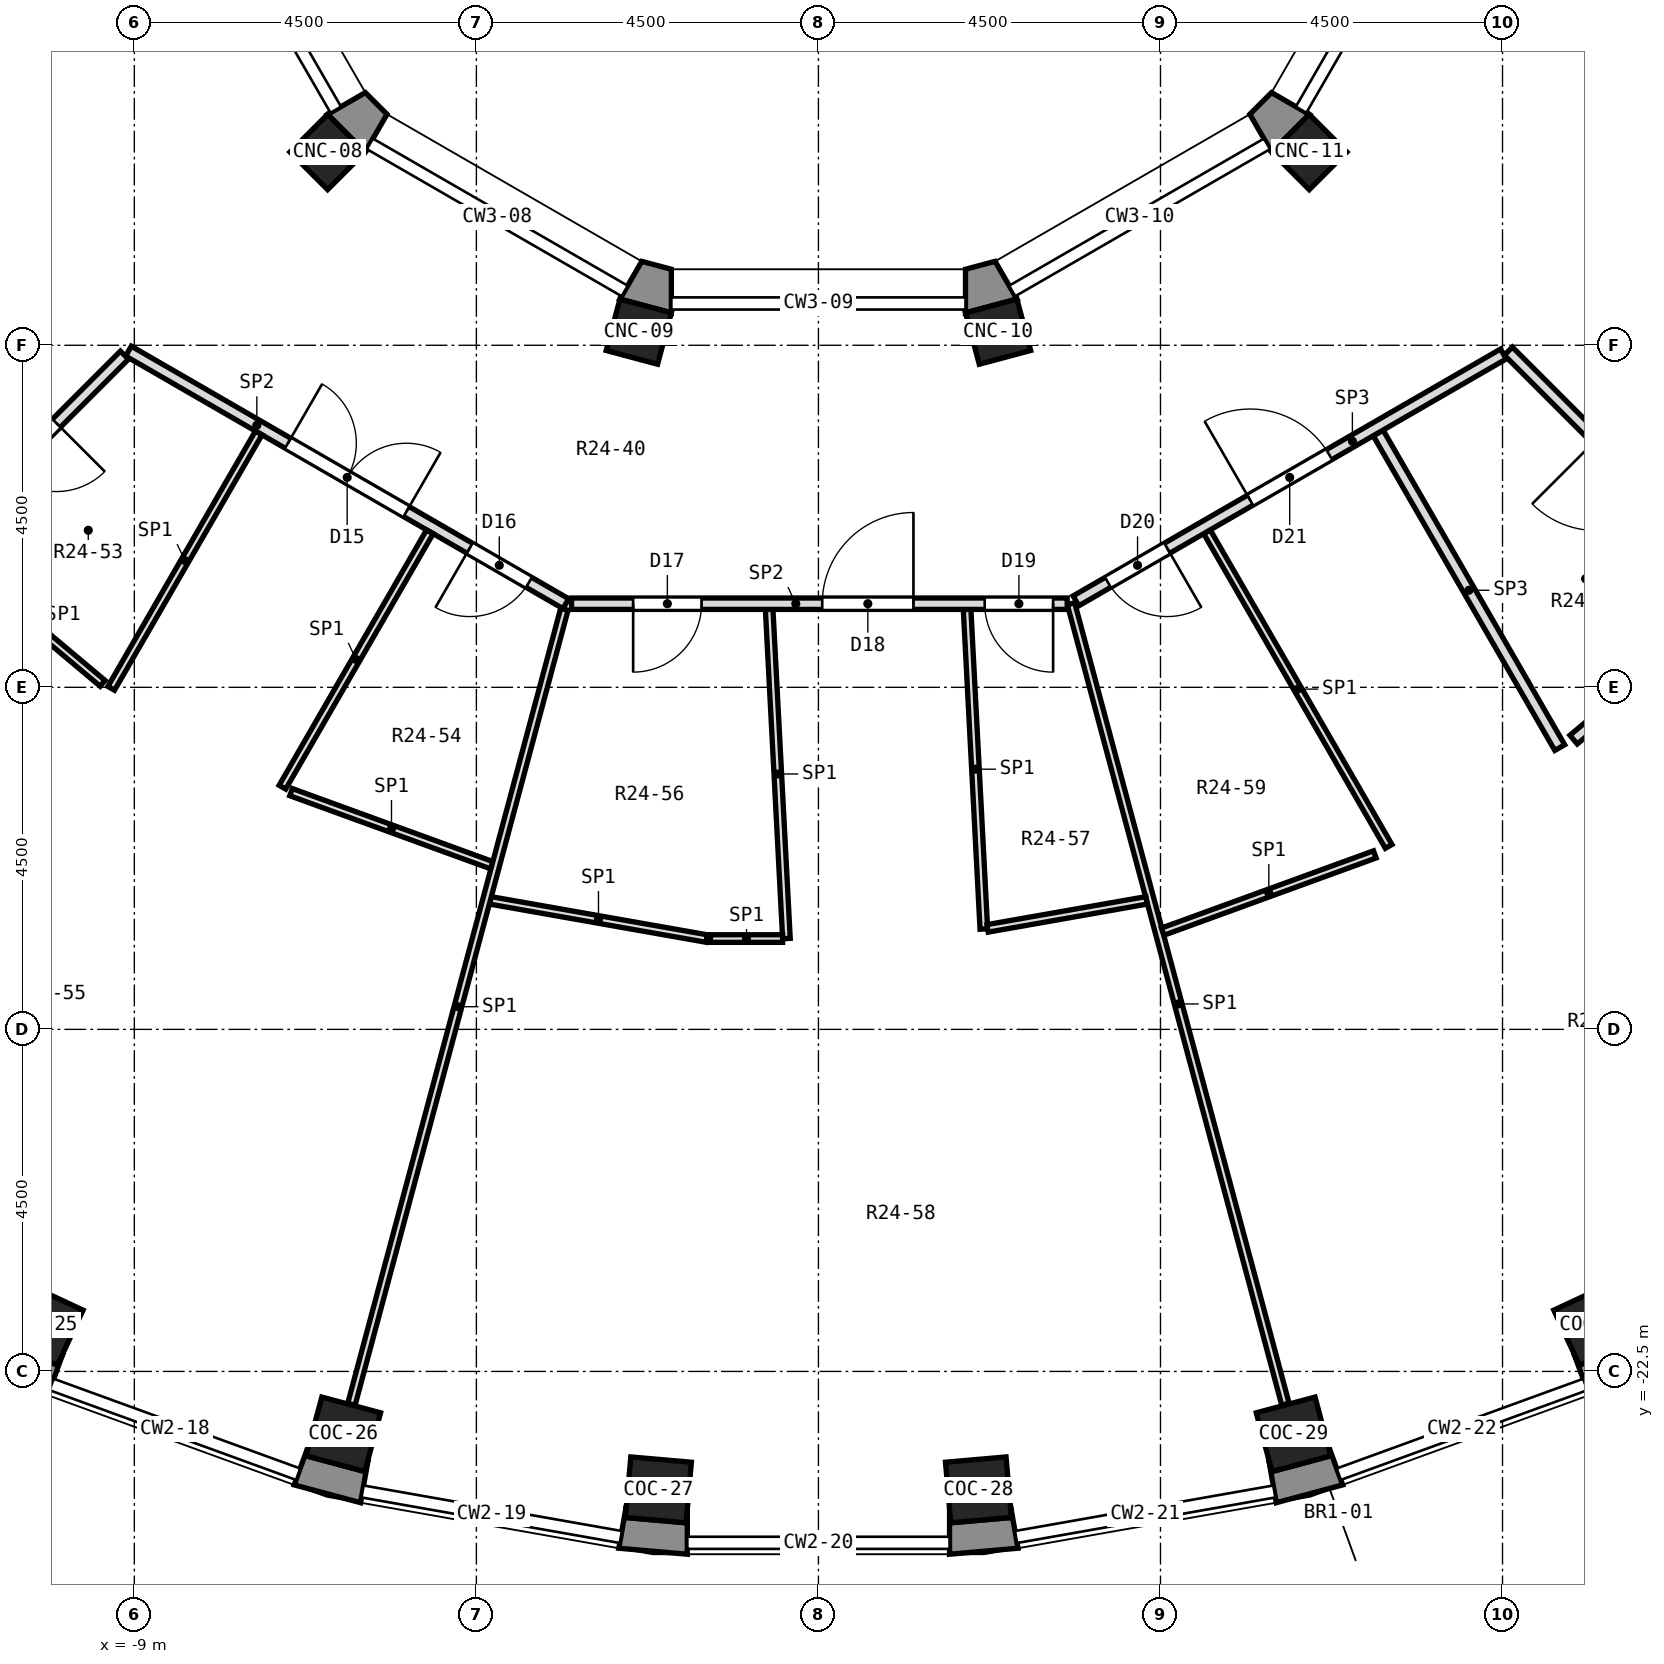
"""IFC4 building model, lengths in metres.
Left out: names, types, materials, properties, quantities, classifications, styles, units other than length and angle.
Written with IfcOpenShell. Run it as: python <this file> out.ifc"""

import sys

from ifc_helpers import new_model, si_unit, direction, frame, frame_2d, origin, origin_2d, place, context, subcontext, project, spatial, polyline, rectangle, outline, extrude, element, fill, save


model = new_model("IFC4")
c1 = context("Model", 3, precision=1e-05, world=origin(), true_north=direction((0.0, 1.0)))
c2 = subcontext(c1, "Body", "Model", "MODEL_VIEW")
j1 = project(units=[si_unit("LENGTHUNIT", "METRE"), si_unit("PLANEANGLEUNIT", "RADIAN")], contexts=[c1])
p1 = place(None, origin())
s1 = spatial("IfcSite", under=j1, at=p1, CompositionType="ELEMENT")
p2 = place(p1, origin())
s2 = spatial("IfcBuilding", under=s1, at=p2, CompositionType="ELEMENT")
p3 = place(p2, frame((0.0, 0.0, 155.8)))
s3 = spatial("IfcBuildingStorey", under=s2, at=p3, CompositionType="ELEMENT", Elevation=155.8)
for number, where, z_axis, x_axis in (
    (1, (-10.206, -21.887, -0.55), (0.0, 0.0, 1.0), (-0.423, -0.906, 0.0)),
    (2, (-6.25, -23.327, -0.55), (0.0, 0.0, 1.0), (-0.259, -0.966, 0.0)),
    (3, (-2.105, -24.058, -0.55), (0.0, 0.0, 1.0), (-0.087, -0.996, 0.0)),
    (4, (2.105, -24.058, -0.55), (0.0, 0.0, 1.0), (0.087, -0.996, 0.0)),
    (5, (6.25, -23.327, -0.55), (0.0, 0.0, 1.0), (0.259, -0.966, 0.0)),
    (6, (10.206, -21.887, -0.55), (0.0, 0.0, 1.0), (0.423, -0.906, 0.0)),
):
    element("IfcColumn", number, at=place(p3, frame(where, z_axis=z_axis, x_axis=x_axis)), inside=s3, PredefinedType="COLUMN", context=c2, shape_type="SweptSolid", body=[
        extrude(rectangle(XDim=0.8, YDim=0.8, at=origin_2d()), origin(), (0.0, 0.0, 1.0), 5.55),
    ])
for number, where, z_axis, x_axis in (
    (7, (-6.458, -6.458, 0.0), (0.0, 0.0, 1.0), (-0.707, -0.707, 0.0)),
    (8, (-2.364, -8.821, 0.0), (0.0, 0.0, 1.0), (-0.259, -0.966, 0.0)),
    (9, (2.364, -8.821, 0.0), (0.0, 0.0, 1.0), (0.259, -0.966, 0.0)),
    (10, (6.458, -6.458, 0.0), (0.0, 0.0, 1.0), (0.707, -0.707, 0.0)),
):
    element("IfcColumn", number, at=place(p3, frame(where, z_axis=z_axis, x_axis=x_axis)), inside=s3, PredefinedType="COLUMN", context=c2, shape_type="SweptSolid", body=[
        extrude(rectangle(XDim=0.7, YDim=0.7, at=origin_2d()), origin(), (0.0, 0.0, 1.0), 5.0),
    ])
p4 = place(p3, origin())
e11 = element("IfcWall", 11, at=p4, inside=s3, PredefinedType="SOLIDWALL", context=c2, shape_type="SweptSolid", body=[
    extrude(outline(polyline([(-10.139, -22.813), (-9.934, -22.249), (-10.013, -22.419), (-10.738, -22.081), (-10.659, -21.911), (-10.959, -22.431), (-10.139, -22.813)])), origin(), (0.0, 0.0, 1.0), 4.55),
])
p5 = place(p3, origin())
e12 = element("IfcWall", 12, at=p5, inside=s3, PredefinedType="SOLIDWALL", context=c2, shape_type="SweptSolid", body=[
    extrude(outline(polyline([(-6.023, -24.227), (-5.919, -23.636), (-5.968, -23.817), (-6.74, -23.61), (-6.692, -23.429), (-6.897, -23.993), (-6.023, -24.227)])), origin(), (0.0, 0.0, 1.0), 4.55),
])
p6 = place(p3, origin())
e13 = element("IfcWall", 13, at=p6, inside=s3, PredefinedType="SOLIDWALL", context=c2, shape_type="SweptSolid", body=[
    extrude(outline(polyline([(-2.626, -24.826), (-1.725, -24.905), (-1.725, -24.305), (-1.741, -24.491), (-2.538, -24.422), (-2.522, -24.235), (-2.626, -24.826)])), origin(), (0.0, 0.0, 1.0), 4.55),
])
p7 = place(p3, origin())
e14 = element("IfcWall", 14, at=p7, inside=s3, PredefinedType="SOLIDWALL", context=c2, shape_type="SweptSolid", body=[
    extrude(outline(polyline([(1.725, -24.905), (2.626, -24.826), (2.522, -24.235), (2.538, -24.422), (1.741, -24.491), (1.725, -24.305), (1.725, -24.905)])), origin(), (0.0, 0.0, 1.0), 4.55),
])
p8 = place(p3, origin())
e15 = element("IfcWall", 15, at=p8, inside=s3, PredefinedType="SOLIDWALL", context=c2, shape_type="SweptSolid", body=[
    extrude(outline(polyline([(6.023, -24.227), (6.897, -23.993), (6.692, -23.429), (6.74, -23.61), (5.968, -23.817), (5.919, -23.636), (6.023, -24.227)])), origin(), (0.0, 0.0, 1.0), 4.55),
])
p9 = place(p3, origin())
e16 = element("IfcWall", 16, at=p9, inside=s3, PredefinedType="SOLIDWALL", context=c2, shape_type="SweptSolid", body=[
    extrude(outline(polyline([(10.959, -22.431), (10.659, -21.911), (10.738, -22.081), (10.013, -22.419), (9.934, -22.249), (10.139, -22.813), (10.959, -22.431)])), origin(), (0.0, 0.0, 1.0), 4.55),
])
p10 = place(p3, origin())
e17 = element("IfcWall", 17, at=p10, inside=s3, PredefinedType="SOLIDWALL", context=c2, shape_type="SweptSolid", body=[
    extrude(outline(polyline([(-6.458, -5.962), (-5.962, -6.458), (-5.676, -5.961), (-5.961, -5.676), (-6.458, -5.962)])), origin(), (0.0, 0.0, 1.0), 4.55),
])
p11 = place(p3, origin())
e18 = element("IfcWall", 18, at=p11, inside=s3, PredefinedType="SOLIDWALL", context=c2, shape_type="SweptSolid", body=[
    extrude(outline(polyline([(-1.935, -8.573), (-1.935, -8.0), (-2.324, -7.896), (-2.611, -8.392), (-1.935, -8.573)])), origin(), (0.0, 0.0, 1.0), 4.55),
])
p12 = place(p3, origin())
e19 = element("IfcWall", 19, at=p12, inside=s3, PredefinedType="SOLIDWALL", context=c2, shape_type="SweptSolid", body=[
    extrude(outline(polyline([(2.611, -8.392), (2.324, -7.896), (1.935, -8.0), (1.935, -8.573), (2.611, -8.392)])), origin(), (0.0, 0.0, 1.0), 4.55),
])
p13 = place(p3, origin())
e20 = element("IfcWall", 20, at=p13, inside=s3, PredefinedType="SOLIDWALL", context=c2, shape_type="SweptSolid", body=[
    extrude(outline(polyline([(5.962, -6.458), (6.458, -5.962), (5.961, -5.676), (5.676, -5.961), (5.962, -6.458)])), origin(), (0.0, 0.0, 1.0), 4.55),
])
p14 = place(p3, frame((-0.648, -12.475, 0.0), z_axis=(0.0, 0.0, 1.0), x_axis=(0.052419936627, -0.998625129988, 0.0)))
e21 = element("IfcWall", 21, at=p14, inside=s3, PredefinedType="PARTITIONING", context=c2, shape_type="SweptSolid", body=[
    extrude(rectangle(XDim=4.336, YDim=0.1, at=frame_2d((2.168, 0.0))), origin(), (0.0, 0.0, 1.0), 4.55),
])
p15 = place(p3, frame((1.956, -12.475, 0.0), z_axis=(0.0, 0.0, 1.0), x_axis=(0.052297124669, -0.998631569074, 0.0)))
e22 = element("IfcWall", 22, at=p15, inside=s3, PredefinedType="PARTITIONING", context=c2, shape_type="SweptSolid", body=[
    extrude(rectangle(XDim=4.211, YDim=0.1, at=frame_2d((2.105, 0.0))), origin(), (0.0, 0.0, 1.0), 4.55),
])
p16 = place(p3, frame((3.323, -12.4, 0.0), z_axis=(0.0, 0.0, 1.0), x_axis=(0.258724519119, -0.965951149493, 0.0)))
e23 = element("IfcWall", 23, at=p16, inside=s3, PredefinedType="PARTITIONING", context=c2, shape_type="SweptSolid", body=[
    extrude(rectangle(XDim=10.903, YDim=0.1, at=frame_2d((5.451, 0.0))), origin(), (0.0, 0.0, 1.0), 4.55),
])
p17 = place(p3, frame((5.112, -11.454, 0.0), z_axis=(0.0, 0.0, 1.0), x_axis=(0.500099733259, -0.865967815103, 0.0)))
e24 = element("IfcWall", 24, at=p17, inside=s3, PredefinedType="PARTITIONING", context=c2, shape_type="SweptSolid", body=[
    extrude(rectangle(XDim=4.78, YDim=0.1, at=frame_2d((2.39, 0.0))), origin(), (0.0, 0.0, 1.0), 4.55),
])
p18 = place(p3, frame((7.364, -10.153, 0.0), z_axis=(0.0, 0.0, 1.0), x_axis=(0.49988015136, -0.866094587373, 0.0)))
e25 = element("IfcWall", 25, at=p18, inside=s3, PredefinedType="PARTITIONING", context=c2, shape_type="SweptSolid", body=[
    extrude(rectangle(XDim=4.78, YDim=0.15, at=frame_2d((2.39, 0.0))), origin(), (0.0, 0.0, 1.0), 4.55),
])
p19 = place(p3, frame((9.077, -9.077, 0.0), z_axis=(0.0, 0.0, 1.0), x_axis=(0.707106781187, -0.707106781187, 0.0)))
e26 = element("IfcWall", 26, at=p19, inside=s3, PredefinedType="PARTITIONING", context=c2, shape_type="SweptSolid", body=[
    extrude(rectangle(XDim=5.71, YDim=0.15, at=frame_2d((2.855, 0.0))), origin(), (0.0, 0.0, 1.0), 4.55),
])
p20 = place(p19, frame((1.642, 0.0, 0.0)))
e27 = element("IfcOpeningElement", 27, at=p20, cuts=e26, PredefinedType="OPENING", context=c2, shape_type="SweptSolid", body=[
    extrude(rectangle(XDim=1.2, YDim=2.1, at=frame_2d((0.6, 1.05))), frame((0.0, 0.087, 0.0), z_axis=(0.0, -1.0, 0.0), x_axis=(1.0, 0.0, 0.0)), (0.0, 0.0, 1.0), 0.174),
])
p21 = place(p3, frame((-11.552, -11.657, 0.0), z_axis=(0.0, 0.0, 1.0), x_axis=(0.766098290504, -0.642723431413, 0.0)))
e28 = element("IfcWall", 28, at=p21, inside=s3, PredefinedType="PARTITIONING", context=c2, shape_type="SweptSolid", body=[
    extrude(rectangle(XDim=2.786, YDim=0.1, at=frame_2d((1.393, 0.0))), origin(), (0.0, 0.0, 1.0), 4.55),
])
p22 = place(p3, frame((-9.077, -9.077, 0.0), z_axis=(0.0, 0.0, 1.0), x_axis=(0.865961614908, -0.500110469302, 0.0)))
e29 = element("IfcWall", 29, at=p22, inside=s3, PredefinedType="PARTITIONING", context=c2, shape_type="SweptSolid", body=[
    extrude(rectangle(XDim=6.645, YDim=0.15, at=frame_2d((3.322, 0.0))), origin(), (0.0, 0.0, 1.0), 4.55),
])
p23 = place(p22, frame((2.422, 0.0, 0.0)))
e30 = element("IfcOpeningElement", 30, at=p23, cuts=e29, PredefinedType="OPENING", context=c2, shape_type="SweptSolid", body=[
    extrude(rectangle(XDim=1.8, YDim=2.1, at=frame_2d((0.9, 1.05))), frame((0.0, 0.087, 0.0), z_axis=(0.0, -1.0, 0.0), x_axis=(1.0, 0.0, 0.0)), (0.0, 0.0, 1.0), 0.174),
])
p24 = place(p22, frame((5.184, 0.0, 0.0)))
e31 = element("IfcOpeningElement", 31, at=p24, cuts=e29, PredefinedType="OPENING", context=c2, shape_type="SweptSolid", body=[
    extrude(rectangle(XDim=0.9, YDim=2.1, at=frame_2d((0.45, 1.05))), frame((0.0, 0.087, 0.0), z_axis=(0.0, -1.0, 0.0), x_axis=(1.0, 0.0, 0.0)), (0.0, 0.0, 1.0), 0.174),
])
p25 = place(p3, frame((-6.938, -14.879, 0.0), z_axis=(0.0, 0.0, 1.0), x_axis=(0.939661525863, -0.342105563842, 0.0)))
e32 = element("IfcWall", 32, at=p25, inside=s3, PredefinedType="PARTITIONING", context=c2, shape_type="SweptSolid", body=[
    extrude(rectangle(XDim=2.812, YDim=0.1, at=frame_2d((1.406, 0.0))), origin(), (0.0, 0.0, 1.0), 4.55),
])
p26 = place(p3, frame((-4.317, -16.303, 0.0), z_axis=(0.0, 0.0, 1.0), x_axis=(0.984792910243, -0.173732334166, 0.0)))
e33 = element("IfcWall", 33, at=p26, inside=s3, PredefinedType="PARTITIONING", context=c2, shape_type="SweptSolid", body=[
    extrude(rectangle(XDim=2.891, YDim=0.1, at=frame_2d((1.445, 0.0))), origin(), (0.0, 0.0, 1.0), 4.55),
])
p27 = place(p3, frame((-1.42, -16.805, 0.0), z_axis=(0.0, 0.0, 1.0), x_axis=(1.0, 0.0, 0.0)))
e34 = element("IfcWall", 34, at=p27, inside=s3, PredefinedType="PARTITIONING", context=c2, shape_type="SweptSolid", body=[
    extrude(rectangle(XDim=0.949, YDim=0.1, at=frame_2d((0.475, 0.0))), origin(), (0.0, 0.0, 1.0), 4.55),
])
p28 = place(p3, frame((-3.248, -12.4, 0.0), z_axis=(0.0, 0.0, 1.0), x_axis=(1.0, 0.0, 0.0)))
e35 = element("IfcWall", 35, at=p28, inside=s3, PredefinedType="PARTITIONING", context=c2, shape_type="SweptSolid", body=[
    extrude(rectangle(XDim=6.521, YDim=0.15, at=frame_2d((3.26, 0.0))), origin(), (0.0, 0.0, 1.0), 4.55),
])
p29 = place(p28, frame((0.811, 0.0, 0.0)))
e36 = element("IfcOpeningElement", 36, at=p29, cuts=e35, PredefinedType="OPENING", context=c2, shape_type="SweptSolid", body=[
    extrude(rectangle(XDim=0.9, YDim=2.1, at=frame_2d((0.45, 1.05))), frame((0.0, 0.087, 0.0), z_axis=(0.0, -1.0, 0.0), x_axis=(1.0, 0.0, 0.0)), (0.0, 0.0, 1.0), 0.174),
])
p30 = place(p28, frame((3.298, 0.0, 0.0)))
e37 = element("IfcOpeningElement", 37, at=p30, cuts=e35, PredefinedType="OPENING", context=c2, shape_type="SweptSolid", body=[
    extrude(rectangle(XDim=1.2, YDim=2.1, at=frame_2d((0.6, 1.05))), frame((0.0, 0.087, 0.0), z_axis=(0.0, -1.0, 0.0), x_axis=(1.0, 0.0, 0.0)), (0.0, 0.0, 1.0), 0.174),
])
p31 = place(p28, frame((5.436, 0.0, 0.0)))
e38 = element("IfcOpeningElement", 38, at=p31, cuts=e35, PredefinedType="OPENING", context=c2, shape_type="SweptSolid", body=[
    extrude(rectangle(XDim=0.9, YDim=2.1, at=frame_2d((0.45, 1.05))), frame((0.0, 0.087, 0.0), z_axis=(0.0, -1.0, 0.0), x_axis=(1.0, 0.0, 0.0)), (0.0, 0.0, 1.0), 0.174),
])
p32 = place(p3, frame((2.225, -16.671, 0.0), z_axis=(0.0, 0.0, 1.0), x_axis=(0.984822876139, 0.173562388302, 0.0)))
e39 = element("IfcWall", 39, at=p32, inside=s3, PredefinedType="PARTITIONING", context=c2, shape_type="SweptSolid", body=[
    extrude(rectangle(XDim=2.124, YDim=0.1, at=frame_2d((1.062, 0.0))), origin(), (0.0, 0.0, 1.0), 4.55),
])
p33 = place(p3, frame((4.53, -16.714, 0.0), z_axis=(0.0, 0.0, 1.0), x_axis=(0.939651702054, 0.342132545699, 0.0)))
e40 = element("IfcWall", 40, at=p33, inside=s3, PredefinedType="PARTITIONING", context=c2, shape_type="SweptSolid", body=[
    extrude(rectangle(XDim=2.969, YDim=0.1, at=frame_2d((1.485, 0.0))), origin(), (0.0, 0.0, 1.0), 4.55),
])
p34 = place(p3, frame((3.388, -12.363, 0.0), z_axis=(0.0, 0.0, 1.0), x_axis=(0.865967095912, 0.5001009786, 0.0)))
e41 = element("IfcWall", 41, at=p34, inside=s3, PredefinedType="PARTITIONING", context=c2, shape_type="SweptSolid", body=[
    extrude(rectangle(XDim=6.495, YDim=0.15, at=frame_2d((3.248, 0.0))), origin(), (0.0, 0.0, 1.0), 4.55),
])
p35 = place(p34, frame((0.486, 0.0, 0.0)))
e42 = element("IfcOpeningElement", 42, at=p35, cuts=e41, PredefinedType="OPENING", context=c2, shape_type="SweptSolid", body=[
    extrude(rectangle(XDim=0.9, YDim=2.1, at=frame_2d((0.45, 1.05))), frame((0.0, 0.087, 0.0), z_axis=(0.0, -1.0, 0.0), x_axis=(1.0, 0.0, 0.0)), (0.0, 0.0, 1.0), 0.174),
])
p36 = place(p34, frame((2.647, 0.0, 0.0)))
e43 = element("IfcOpeningElement", 43, at=p36, cuts=e41, PredefinedType="OPENING", context=c2, shape_type="SweptSolid", body=[
    extrude(rectangle(XDim=1.2, YDim=2.1, at=frame_2d((0.6, 1.05))), frame((0.0, 0.087, 0.0), z_axis=(0.0, -1.0, 0.0), x_axis=(1.0, 0.0, 0.0)), (0.0, 0.0, 1.0), 0.174),
])
p37 = place(p3, frame((9.935, -14.188, 0.0), z_axis=(0.0, 0.0, 1.0), x_axis=(0.766150707514, 0.642660947448, 0.0)))
e44 = element("IfcWall", 44, at=p37, inside=s3, PredefinedType="PARTITIONING", context=c2, shape_type="SweptSolid", body=[
    extrude(rectangle(XDim=2.944, YDim=0.15, at=frame_2d((1.472, 0.0))), origin(), (0.0, 0.0, 1.0), 4.55),
])
p38 = place(p3, frame((-13.115, -13.115, 0.0), z_axis=(0.0, 0.0, 1.0), x_axis=(0.707106781187, 0.707106781187, 0.0)))
e45 = element("IfcWall", 45, at=p38, inside=s3, PredefinedType="PARTITIONING", context=c2, shape_type="SweptSolid", body=[
    extrude(rectangle(XDim=5.635, YDim=0.15, at=frame_2d((2.817, 0.0))), origin(), (0.0, 0.0, 1.0), 4.55),
])
p39 = place(p38, frame((3.47, 0.0, 0.0)))
e46 = element("IfcOpeningElement", 46, at=p39, cuts=e45, PredefinedType="OPENING", context=c2, shape_type="SweptSolid", body=[
    extrude(rectangle(XDim=0.9, YDim=2.1, at=frame_2d((0.45, 1.05))), frame((0.0, 0.087, 0.0), z_axis=(0.0, -1.0, 0.0), x_axis=(1.0, 0.0, 0.0)), (0.0, 0.0, 1.0), 0.174),
])
p40 = place(p3, frame((-7.052, -14.814, 0.0), z_axis=(0.0, 0.0, 1.0), x_axis=(0.499922173165, 0.866070332466, 0.0)))
e47 = element("IfcWall", 47, at=p40, inside=s3, PredefinedType="PARTITIONING", context=c2, shape_type="SweptSolid", body=[
    extrude(rectangle(XDim=3.88, YDim=0.1, at=frame_2d((1.94, 0.0))), origin(), (0.0, 0.0, 1.0), 4.55),
])
p41 = place(p3, frame((-9.304, -13.513, 0.0), z_axis=(0.0, 0.0, 1.0), x_axis=(0.500185351818, 0.865918364412, 0.0)))
e48 = element("IfcWall", 48, at=p41, inside=s3, PredefinedType="PARTITIONING", context=c2, shape_type="SweptSolid", body=[
    extrude(rectangle(XDim=3.88, YDim=0.1, at=frame_2d((1.94, 0.0))), origin(), (0.0, 0.0, 1.0), 4.55),
])
p42 = place(p3, frame((-6.144, -22.931, 0.0), z_axis=(0.0, 0.0, 1.0), x_axis=(0.258715046682, 0.965953686582, 0.0)))
e49 = element("IfcWall", 49, at=p42, inside=s3, PredefinedType="PARTITIONING", context=c2, shape_type="SweptSolid", body=[
    extrude(rectangle(XDim=10.828, YDim=0.1, at=frame_2d((5.414, 0.0))), origin(), (0.0, 0.0, 1.0), 4.55),
])
p43 = place(p39, frame((0.9, 0.0, 0.0), z_axis=(0.0, 0.0, 1.0), x_axis=(-1.0, 0.0, 0.0)))
e50 = element("IfcDoor", 50, at=p43, inside=s3, OperationType="SINGLE_SWING_LEFT", PredefinedType="DOOR", context=c2, shape_type="SweptSolid", body=[
    extrude(rectangle(XDim=0.9, YDim=2.1, at=frame_2d((0.45, 1.05))), frame((0.0, 0.025, 0.0), z_axis=(0.0, -1.0, 0.0), x_axis=(1.0, 0.0, 0.0)), (0.0, 0.0, 1.0), 0.05),
])
fill(e46, e50)
p44 = place(p23, origin())
e51 = element("IfcDoor", 51, at=p44, inside=s3, OperationType="DOUBLE_DOOR_SINGLE_SWING", PredefinedType="DOOR", context=c2, shape_type="SweptSolid", body=[
    extrude(rectangle(XDim=1.8, YDim=2.1, at=frame_2d((0.9, 1.05))), frame((0.0, 0.025, 0.0), z_axis=(0.0, -1.0, 0.0), x_axis=(1.0, 0.0, 0.0)), (0.0, 0.0, 1.0), 0.05),
])
fill(e30, e51)
p45 = place(p24, frame((0.9, 0.0, 0.0), z_axis=(0.0, 0.0, 1.0), x_axis=(-1.0, 0.0, 0.0)))
e52 = element("IfcDoor", 52, at=p45, inside=s3, OperationType="SINGLE_SWING_RIGHT", PredefinedType="DOOR", context=c2, shape_type="SweptSolid", body=[
    extrude(rectangle(XDim=0.9, YDim=2.1, at=frame_2d((0.45, 1.05))), frame((0.0, 0.025, 0.0), z_axis=(0.0, -1.0, 0.0), x_axis=(1.0, 0.0, 0.0)), (0.0, 0.0, 1.0), 0.05),
])
fill(e31, e52)
p46 = place(p29, frame((0.9, 0.0, 0.0), z_axis=(0.0, 0.0, 1.0), x_axis=(-1.0, 0.0, 0.0)))
e53 = element("IfcDoor", 53, at=p46, inside=s3, OperationType="SINGLE_SWING_RIGHT", PredefinedType="DOOR", context=c2, shape_type="SweptSolid", body=[
    extrude(rectangle(XDim=0.9, YDim=2.1, at=frame_2d((0.45, 1.05))), frame((0.0, 0.025, 0.0), z_axis=(0.0, -1.0, 0.0), x_axis=(1.0, 0.0, 0.0)), (0.0, 0.0, 1.0), 0.05),
])
fill(e36, e53)
p47 = place(p30, origin())
e54 = element("IfcDoor", 54, at=p47, inside=s3, OperationType="SINGLE_SWING_RIGHT", PredefinedType="DOOR", context=c2, shape_type="SweptSolid", body=[
    extrude(rectangle(XDim=1.2, YDim=2.1, at=frame_2d((0.6, 1.05))), frame((0.0, 0.025, 0.0), z_axis=(0.0, -1.0, 0.0), x_axis=(1.0, 0.0, 0.0)), (0.0, 0.0, 1.0), 0.05),
])
fill(e37, e54)
p48 = place(p31, frame((0.9, 0.0, 0.0), z_axis=(0.0, 0.0, 1.0), x_axis=(-1.0, 0.0, 0.0)))
e55 = element("IfcDoor", 55, at=p48, inside=s3, OperationType="SINGLE_SWING_LEFT", PredefinedType="DOOR", context=c2, shape_type="SweptSolid", body=[
    extrude(rectangle(XDim=0.9, YDim=2.1, at=frame_2d((0.45, 1.05))), frame((0.0, 0.025, 0.0), z_axis=(0.0, -1.0, 0.0), x_axis=(1.0, 0.0, 0.0)), (0.0, 0.0, 1.0), 0.05),
])
fill(e38, e55)
p49 = place(p35, frame((0.9, 0.0, 0.0), z_axis=(0.0, 0.0, 1.0), x_axis=(-1.0, 0.0, 0.0)))
e56 = element("IfcDoor", 56, at=p49, inside=s3, OperationType="SINGLE_SWING_LEFT", PredefinedType="DOOR", context=c2, shape_type="SweptSolid", body=[
    extrude(rectangle(XDim=0.9, YDim=2.1, at=frame_2d((0.45, 1.05))), frame((0.0, 0.025, 0.0), z_axis=(0.0, -1.0, 0.0), x_axis=(1.0, 0.0, 0.0)), (0.0, 0.0, 1.0), 0.05),
])
fill(e42, e56)
p50 = place(p36, origin())
e57 = element("IfcDoor", 57, at=p50, inside=s3, OperationType="SINGLE_SWING_LEFT", PredefinedType="DOOR", context=c2, shape_type="SweptSolid", body=[
    extrude(rectangle(XDim=1.2, YDim=2.1, at=frame_2d((0.6, 1.05))), frame((0.0, 0.025, 0.0), z_axis=(0.0, -1.0, 0.0), x_axis=(1.0, 0.0, 0.0)), (0.0, 0.0, 1.0), 0.05),
])
fill(e43, e57)
save(model, sys.argv[1])
